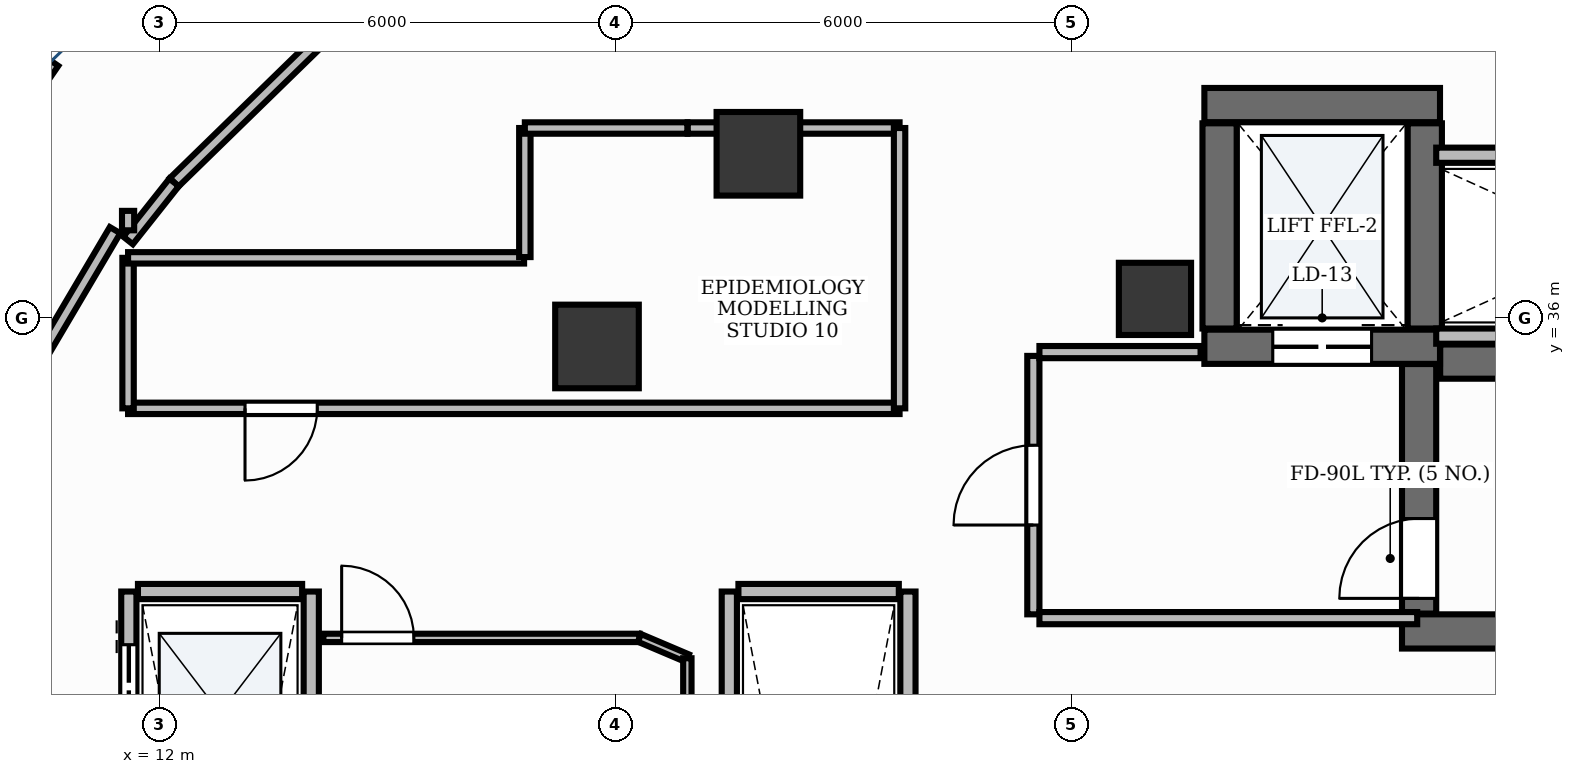
"""IFC4 building model, lengths in metres.
Left out: names, types, materials, properties, quantities, classifications, styles, units other than length and angle.
Written with IfcOpenShell. Run it as: python <this file> out.ifc"""

import sys

from ifc_helpers import new_model, si_unit, direction, frame, frame_2d, origin, origin_2d, place, context, subcontext, project, spatial, rectangle, extrude, element, fill, save


model = new_model("IFC4")
c1 = context("Model", 3, precision=1e-05, world=origin(), true_north=direction((0.0, 1.0)))
c2 = subcontext(c1, "Body", "Model", "MODEL_VIEW")
j1 = project(units=[si_unit("LENGTHUNIT", "METRE"), si_unit("PLANEANGLEUNIT", "RADIAN")], contexts=[c1])
p1 = place(None, origin())
s1 = spatial("IfcSite", under=j1, at=p1, CompositionType="ELEMENT")
p2 = place(p1, origin())
s2 = spatial("IfcBuilding", under=s1, at=p2, CompositionType="ELEMENT")
p3 = place(p2, frame((0.0, 0.0, 94.2)))
s3 = spatial("IfcBuildingStorey", under=s2, at=p3, CompositionType="ELEMENT", Elevation=94.2)
p4 = place(p3, frame((28.852, 35.425, 0.0), z_axis=(0.0, 0.0, 1.0), x_axis=(1.0, 0.0, 0.0)))
e1 = element("IfcWall", 1, at=p4, inside=s3, PredefinedType="SHEAR", context=c2, shape_type="SweptSolid", body=[
    extrude(rectangle(XDim=8.248, YDim=0.45, at=frame_2d((4.124, 0.0))), origin(), (0.0, 0.0, 1.0), 3.9),
])
p5 = place(p3, frame((28.35, 31.875, 0.0), z_axis=(0.0, 0.0, 1.0), x_axis=(1.0, 0.0, 0.0)))
e2 = element("IfcWall", 2, at=p5, inside=s3, PredefinedType="SHEAR", context=c2, shape_type="SweptSolid", body=[
    extrude(rectangle(XDim=8.75, YDim=0.45, at=frame_2d((4.375, 0.0))), origin(), (0.0, 0.0, 1.0), 3.9),
])
p6 = place(p3, frame((28.575, 32.11, 0.0), z_axis=(0.0, 0.0, 1.0), x_axis=(0.0, 1.0, 0.0)))
e3 = element("IfcWall", 3, at=p6, inside=s3, PredefinedType="SHEAR", context=c2, shape_type="SweptSolid", body=[
    extrude(rectangle(XDim=3.283, YDim=0.45, at=frame_2d((1.642, 0.0))), origin(), (0.0, 0.0, 1.0), 3.9),
])
p7 = place(p6, frame((0.2, 0.0, 0.0)))
e4 = element("IfcOpeningElement", 4, at=p7, cuts=e3, PredefinedType="OPENING", context=c2, shape_type="SweptSolid", body=[
    extrude(rectangle(XDim=1.05, YDim=2.15, at=frame_2d((0.525, 1.075))), frame((0.0, 0.24, 0.0), z_axis=(0.0, -1.0, 0.0), x_axis=(1.0, 0.0, 0.0)), (0.0, 0.0, 1.0), 0.48),
])
p8 = place(p3, frame((25.75, 38.8, 0.0), z_axis=(0.0, 0.0, 1.0), x_axis=(1.0, 0.0, 0.0)))
e5 = element("IfcWall", 5, at=p8, inside=s3, PredefinedType="SHEAR", context=c2, shape_type="SweptSolid", body=[
    extrude(rectangle(XDim=3.1, YDim=0.45, at=frame_2d((1.55, 0.0))), origin(), (0.0, 0.0, 1.0), 3.9),
])
p9 = place(p3, frame((25.75, 35.62, 0.0), z_axis=(0.0, 0.0, 1.0), x_axis=(1.0, 0.0, 0.0)))
e6 = element("IfcWall", 6, at=p9, inside=s3, PredefinedType="SHEAR", context=c2, shape_type="SweptSolid", body=[
    extrude(rectangle(XDim=3.1, YDim=0.45, at=frame_2d((1.55, 0.0))), origin(), (0.0, 0.0, 1.0), 3.9),
])
p10 = place(p9, frame((0.9, 0.0, 0.0)))
e7 = element("IfcOpeningElement", 7, at=p10, cuts=e6, PredefinedType="OPENING", context=c2, shape_type="SweptSolid", body=[
    extrude(rectangle(XDim=1.3, YDim=2.2, at=frame_2d((0.65, 1.1))), frame((0.0, 0.24, 0.0), z_axis=(0.0, -1.0, 0.0), x_axis=(1.0, 0.0, 0.0)), (0.0, 0.0, 1.0), 0.48),
])
for number, where, z_axis, x_axis in (
    (8, (25.95, 35.86, 0.0), (0.0, 0.0, 1.0), (0.0, 1.0, 0.0)),
    (9, (28.65, 35.86, 0.0), (0.0, 0.0, 1.0), (0.0, 1.0, 0.0)),
):
    element("IfcWall", number, at=place(p3, frame(where, z_axis=z_axis, x_axis=x_axis)), inside=s3, PredefinedType="SHEAR", context=c2, shape_type="SweptSolid", body=[
        extrude(rectangle(XDim=2.7, YDim=0.45, at=frame_2d((1.35, 0.0))), origin(), (0.0, 0.0, 1.0), 3.9),
    ])
p11 = place(p3, frame((25.1, 36.25, -0.0), z_axis=(0.0, 0.0, 1.0), x_axis=(1.0, 0.0, 0.0)))
e10 = element("IfcColumn", 10, at=p11, inside=s3, PredefinedType="PILASTER", context=c2, shape_type="SweptSolid", body=[
    extrude(rectangle(XDim=0.95, YDim=0.95, at=origin_2d()), origin(), (0.0, 0.0, 1.0), 3.901),
])
for number, where, z_axis, x_axis in (
    (11, (19.883, 38.159, -0.0), (0.0, 0.0, 1.0), (1.0, 0.0, 0.0)),
    (12, (17.759, 35.624, -0.0), (0.0, 0.0, 1.0), (1.0, 0.0, 0.0)),
):
    element("IfcColumn", number, at=place(p3, frame(where, z_axis=z_axis, x_axis=x_axis)), inside=s3, PredefinedType="COLUMN", context=c2, shape_type="SweptSolid", body=[
        extrude(rectangle(XDim=1.1, YDim=1.1, at=origin_2d()), origin(), (0.0, 0.0, 1.0), 3.901),
    ])
p12 = place(p3, frame((10.548, 39.4, 0.0), z_axis=(0.0, 0.0, 1.0), x_axis=(-0.566825798999, -0.823837674296, 0.0)))
e13 = element("IfcWall", 13, at=p12, inside=s3, PredefinedType="STANDARD", context=c2, shape_type="SweptSolid", body=[
    extrude(rectangle(XDim=5.826, YDim=0.3, at=frame_2d((2.913, 0.0))), origin(), (0.0, 0.0, 1.0), 3.47),
])
p13 = place(p3, frame((11.6, 21.6, 0.0), z_axis=(0.0, 0.0, 1.0), x_axis=(0.0, 1.0, 0.0)))
e14 = element("IfcWall", 14, at=p13, inside=s3, PredefinedType="PARTITIONING", context=c2, shape_type="SweptSolid", body=[
    extrude(rectangle(XDim=10.8, YDim=0.2, at=frame_2d((5.4, 0.0))), origin(), (0.0, 0.0, 1.0), 2.91),
])
p14 = place(p13, frame((0.9, 0.0, 0.0)))
e15 = element("IfcOpeningElement", 15, at=p14, cuts=e14, PredefinedType="OPENING", context=c2, shape_type="SweptSolid", body=[
    extrude(rectangle(XDim=1.1, YDim=2.2, at=frame_2d((0.55, 1.1))), frame((0.0, 0.115, 0.0), z_axis=(0.0, -1.0, 0.0), x_axis=(1.0, 0.0, 0.0)), (0.0, 0.0, 1.0), 0.23),
])
p15 = place(p13, frame((3.6, 0.0, 0.0)))
e16 = element("IfcOpeningElement", 16, at=p15, cuts=e14, PredefinedType="OPENING", context=c2, shape_type="SweptSolid", body=[
    extrude(rectangle(XDim=1.1, YDim=2.2, at=frame_2d((0.55, 1.1))), frame((0.0, 0.115, 0.0), z_axis=(0.0, -1.0, 0.0), x_axis=(1.0, 0.0, 0.0)), (0.0, 0.0, 1.0), 0.23),
])
p16 = place(p13, frame((6.3, 0.0, 0.0)))
e17 = element("IfcOpeningElement", 17, at=p16, cuts=e14, PredefinedType="OPENING", context=c2, shape_type="SweptSolid", body=[
    extrude(rectangle(XDim=1.1, YDim=2.2, at=frame_2d((0.55, 1.1))), frame((0.0, 0.115, 0.0), z_axis=(0.0, -1.0, 0.0), x_axis=(1.0, 0.0, 0.0)), (0.0, 0.0, 1.0), 0.23),
])
p17 = place(p13, frame((9.0, 0.0, 0.0)))
e18 = element("IfcOpeningElement", 18, at=p17, cuts=e14, PredefinedType="OPENING", context=c2, shape_type="SweptSolid", body=[
    extrude(rectangle(XDim=1.1, YDim=2.2, at=frame_2d((0.55, 1.1))), frame((0.0, 0.115, 0.0), z_axis=(0.0, -1.0, 0.0), x_axis=(1.0, 0.0, 0.0)), (0.0, 0.0, 1.0), 0.23),
])
p18 = place(p3, frame((14.0, 21.6, 0.0), z_axis=(0.0, 0.0, 1.0), x_axis=(0.0, 1.0, 0.0)))
e19 = element("IfcWall", 19, at=p18, inside=s3, PredefinedType="PARTITIONING", context=c2, shape_type="SweptSolid", body=[
    extrude(rectangle(XDim=10.8, YDim=0.2, at=frame_2d((5.4, 0.0))), origin(), (0.0, 0.0, 1.0), 2.91),
])
p19 = place(p3, frame((11.72, 32.4, 0.0), z_axis=(0.0, 0.0, 1.0), x_axis=(1.0, 0.0, 0.0)))
e20 = element("IfcWall", 20, at=p19, inside=s3, PredefinedType="PARTITIONING", context=c2, shape_type="SweptSolid", body=[
    extrude(rectangle(XDim=2.16, YDim=0.2, at=frame_2d((1.08, 0.0))), origin(), (0.0, 0.0, 1.0), 2.91),
])
for number, where, z_axis, x_axis in (
    (21, (19.5, 21.6, 0.0), (0.0, 0.0, 1.0), (0.0, 1.0, 0.0)),
    (22, (21.85, 21.6, 0.0), (0.0, 0.0, 1.0), (0.0, 1.0, 0.0)),
):
    element("IfcWall", number, at=place(p3, frame(where, z_axis=z_axis, x_axis=x_axis)), inside=s3, PredefinedType="PARTITIONING", context=c2, shape_type="SweptSolid", body=[
        extrude(rectangle(XDim=10.8, YDim=0.2, at=frame_2d((5.4, 0.0))), origin(), (0.0, 0.0, 1.0), 2.91),
    ])
p20 = place(p3, frame((19.62, 32.4, 0.0), z_axis=(0.0, 0.0, 1.0), x_axis=(1.0, 0.0, 0.0)))
e23 = element("IfcWall", 23, at=p20, inside=s3, PredefinedType="PARTITIONING", context=c2, shape_type="SweptSolid", body=[
    extrude(rectangle(XDim=2.11, YDim=0.2, at=frame_2d((1.055, 0.0))), origin(), (0.0, 0.0, 1.0), 2.91),
])
for number, where, z_axis, x_axis in (
    (24, (28.8, 35.76, 0.0), (0.0, 0.0, 1.0), (1.0, 0.0, 0.0)),
    (25, (28.8, 38.14, 0.0), (0.0, 0.0, 1.0), (1.0, 0.0, 0.0)),
):
    element("IfcWall", number, at=place(p3, frame(where, z_axis=z_axis, x_axis=x_axis)), inside=s3, PredefinedType="PARTITIONING", context=c2, shape_type="SweptSolid", body=[
        extrude(rectangle(XDim=4.57, YDim=0.2, at=frame_2d((2.285, 0.0))), origin(), (0.0, 0.0, 1.0), 2.91),
    ])
p21 = place(p3, frame((23.5, 32.1, 0.0), z_axis=(0.0, 0.0, 1.0), x_axis=(0.0, 1.0, 0.0)))
e26 = element("IfcWall", 26, at=p21, inside=s3, PredefinedType="PARTITIONING", context=c2, shape_type="SweptSolid", body=[
    extrude(rectangle(XDim=3.4, YDim=0.16, at=frame_2d((1.7, 0.0))), origin(), (0.0, 0.0, 1.0), 2.91),
])
p22 = place(p21, frame((1.175, 0.0, 0.0)))
e27 = element("IfcOpeningElement", 27, at=p22, cuts=e26, PredefinedType="OPENING", context=c2, shape_type="SweptSolid", body=[
    extrude(rectangle(XDim=1.05, YDim=2.15, at=frame_2d((0.525, 1.075))), frame((0.0, 0.095, 0.0), z_axis=(0.0, -1.0, 0.0), x_axis=(1.0, 0.0, 0.0)), (0.0, 0.0, 1.0), 0.19),
])
p23 = place(p3, frame((23.58, 32.05, 0.0), z_axis=(0.0, 0.0, 1.0), x_axis=(1.0, 0.0, 0.0)))
e28 = element("IfcWall", 28, at=p23, inside=s3, PredefinedType="PARTITIONING", context=c2, shape_type="SweptSolid", body=[
    extrude(rectangle(XDim=4.97, YDim=0.16, at=frame_2d((2.485, 0.0))), origin(), (0.0, 0.0, 1.0), 2.91),
])
p24 = place(p3, frame((23.58, 35.55, 0.0), z_axis=(0.0, 0.0, 1.0), x_axis=(1.0, 0.0, 0.0)))
e29 = element("IfcWall", 29, at=p24, inside=s3, PredefinedType="PARTITIONING", context=c2, shape_type="SweptSolid", body=[
    extrude(rectangle(XDim=2.12, YDim=0.16, at=frame_2d((1.06, 0.0))), origin(), (0.0, 0.0, 1.0), 2.91),
])
p25 = place(p3, frame((21.74, 34.81, 0.0), z_axis=(0.0, 0.0, 1.0), x_axis=(-1.0, 0.0, 0.0)))
e30 = element("IfcWall", 30, at=p25, inside=s3, PredefinedType="PARTITIONING", context=c2, shape_type="SweptSolid", body=[
    extrude(rectangle(XDim=10.15, YDim=0.15, at=frame_2d((5.075, 0.0))), origin(), (0.0, 0.0, 1.0), 2.91),
])
p26 = place(p25, frame((7.662, 0.0, 0.0)))
e31 = element("IfcOpeningElement", 31, at=p26, cuts=e30, PredefinedType="OPENING", context=c2, shape_type="SweptSolid", body=[
    extrude(rectangle(XDim=0.95, YDim=2.15, at=frame_2d((0.475, 1.075))), frame((0.0, 0.09, 0.0), z_axis=(0.0, -1.0, 0.0), x_axis=(1.0, 0.0, 0.0)), (0.0, 0.0, 1.0), 0.18),
])
p27 = place(p3, frame((14.16, 31.79, 0.0), z_axis=(0.0, 0.0, 1.0), x_axis=(1.0, 0.0, 0.0)))
e32 = element("IfcWall", 32, at=p27, inside=s3, PredefinedType="MOVABLE", context=c2, shape_type="SweptSolid", body=[
    extrude(rectangle(XDim=4.158, YDim=0.11, at=frame_2d((2.079, 0.0))), origin(), (0.0, 0.0, 1.0), 2.91),
])
p28 = place(p27, frame((0.24, 0.0, 0.0)))
e33 = element("IfcOpeningElement", 33, at=p28, cuts=e32, PredefinedType="OPENING", context=c2, shape_type="SweptSolid", body=[
    extrude(rectangle(XDim=0.95, YDim=2.15, at=frame_2d((0.475, 1.075))), frame((0.0, 0.07, 0.0), z_axis=(0.0, -1.0, 0.0), x_axis=(1.0, 0.0, 0.0)), (0.0, 0.0, 1.0), 0.14),
])
p29 = place(p3, frame((14.114, 39.653, 0.0), z_axis=(0.0, 0.0, 1.0), x_axis=(-0.716161838398, -0.697934252794, 0.0)))
e34 = element("IfcWall", 34, at=p29, inside=s3, PredefinedType="PARTITIONING", context=c2, shape_type="SweptSolid", body=[
    extrude(rectangle(XDim=2.679, YDim=0.16, at=frame_2d((1.339, 0.0))), origin(), (0.0, 0.0, 1.0), 2.91),
])
p30 = place(p3, frame((12.195, 37.782, 0.0), z_axis=(0.0, 0.0, 1.0), x_axis=(-0.621081637991, -0.783745876513, 0.0)))
e35 = element("IfcWall", 35, at=p30, inside=s3, PredefinedType="PARTITIONING", context=c2, shape_type="SweptSolid", body=[
    extrude(rectangle(XDim=0.974, YDim=0.16, at=frame_2d((0.487, 0.0))), origin(), (0.0, 0.0, 1.0), 2.91),
])
p31 = place(p3, frame((11.59, 37.152, 0.0), z_axis=(0.0, 0.0, 1.0), x_axis=(0.0, 1.0, 0.0)))
e36 = element("IfcWall", 36, at=p31, inside=s3, PredefinedType="PARTITIONING", context=c2, shape_type="SweptSolid", body=[
    extrude(rectangle(XDim=0.256, YDim=0.16, at=frame_2d((0.128, 0.0))), origin(), (0.0, 0.0, 1.0), 2.91),
])
p32 = place(p3, frame((11.419, 37.154, 0.0), z_axis=(0.0, 0.0, 1.0), x_axis=(-0.508183269016, -0.861248956511, 0.0)))
e37 = element("IfcWall", 37, at=p32, inside=s3, PredefinedType="PARTITIONING", context=c2, shape_type="SweptSolid", body=[
    extrude(rectangle(XDim=4.053, YDim=0.16, at=frame_2d((2.026, 0.0))), origin(), (0.0, 0.0, 1.0), 2.91),
])
p33 = place(p3, frame((18.952, 38.498, 0.0), z_axis=(0.0, 0.0, 1.0), x_axis=(1.0, 0.0, 0.0)))
e38 = element("IfcWall", 38, at=p33, inside=s3, PredefinedType="PARTITIONING", context=c2, shape_type="SweptSolid", body=[
    extrude(rectangle(XDim=2.788, YDim=0.15, at=frame_2d((1.394, 0.0))), origin(), (0.0, 0.0, 1.0), 2.91),
])
p34 = place(p3, frame((21.74, 38.498, 0.0), z_axis=(0.0, 0.0, 1.0), x_axis=(0.0, -1.0, 0.0)))
e39 = element("IfcWall", 39, at=p34, inside=s3, PredefinedType="PARTITIONING", context=c2, shape_type="SweptSolid", body=[
    extrude(rectangle(XDim=3.688, YDim=0.15, at=frame_2d((1.844, 0.0))), origin(), (0.0, 0.0, 1.0), 2.91),
])
p35 = place(p3, frame((11.59, 34.81, 0.0), z_axis=(0.0, 0.0, 1.0), x_axis=(0.0, 1.0, 0.0)))
e40 = element("IfcWall", 40, at=p35, inside=s3, PredefinedType="PARTITIONING", context=c2, shape_type="SweptSolid", body=[
    extrude(rectangle(XDim=1.98, YDim=0.15, at=frame_2d((0.99, 0.0))), origin(), (0.0, 0.0, 1.0), 2.91),
])
p36 = place(p3, frame((11.59, 36.79, 0.0), z_axis=(0.0, 0.0, 1.0), x_axis=(1.0, 0.0, 0.0)))
e41 = element("IfcWall", 41, at=p36, inside=s3, PredefinedType="PARTITIONING", context=c2, shape_type="SweptSolid", body=[
    extrude(rectangle(XDim=5.21, YDim=0.15, at=frame_2d((2.605, 0.0))), origin(), (0.0, 0.0, 1.0), 2.91),
])
p37 = place(p3, frame((16.81, 36.8, 0.0), z_axis=(0.0, 0.0, 1.0), x_axis=(0.0, 1.0, 0.0)))
e42 = element("IfcWall", 42, at=p37, inside=s3, PredefinedType="PARTITIONING", context=c2, shape_type="SweptSolid", body=[
    extrude(rectangle(XDim=1.698, YDim=0.15, at=frame_2d((0.849, 0.0))), origin(), (0.0, 0.0, 1.0), 2.91),
])
p38 = place(p3, frame((16.81, 38.498, 0.0), z_axis=(0.0, 0.0, 1.0), x_axis=(1.0, 0.0, 0.0)))
e43 = element("IfcWall", 43, at=p38, inside=s3, PredefinedType="PARTITIONING", context=c2, shape_type="SweptSolid", body=[
    extrude(rectangle(XDim=2.138, YDim=0.15, at=frame_2d((1.069, 0.0))), origin(), (0.0, 0.0, 1.0), 2.91),
])
p39 = place(p3, frame((18.318, 31.79, 0.0), z_axis=(0.0, 0.0, 1.0), x_axis=(0.920523463189, -0.390687283795, 0.0)))
e44 = element("IfcWall", 44, at=p39, inside=s3, PredefinedType="MOVABLE", context=c2, shape_type="SweptSolid", body=[
    extrude(rectangle(XDim=0.684, YDim=0.11, at=frame_2d((0.342, 0.0))), origin(), (0.0, 0.0, 1.0), 2.91),
])
p40 = place(p3, frame((18.948, 31.522, 0.0), z_axis=(0.0, 0.0, 1.0), x_axis=(0.0, -1.0, 0.0)))
e45 = element("IfcWall", 45, at=p40, inside=s3, PredefinedType="MOVABLE", context=c2, shape_type="SweptSolid", body=[
    extrude(rectangle(XDim=3.475, YDim=0.11, at=frame_2d((1.738, 0.0))), origin(), (0.0, 0.0, 1.0), 2.91),
])
p41 = place(p7, origin())
e46 = element("IfcDoor", 46, at=p41, inside=s3, OperationType="SINGLE_SWING_LEFT", PredefinedType="DOOR", context=c2, shape_type="SweptSolid", body=[
    extrude(rectangle(XDim=1.05, YDim=2.15, at=frame_2d((0.525, 1.075))), frame((0.0, 0.025, 0.0), z_axis=(0.0, -1.0, 0.0), x_axis=(1.0, 0.0, 0.0)), (0.0, 0.0, 1.0), 0.05),
])
fill(e4, e46)
p42 = place(p17, origin())
e47 = element("IfcDoor", 47, at=p42, inside=s3, OperationType="DOUBLE_DOOR_SLIDING", PredefinedType="DOOR", context=c2, shape_type="SweptSolid", body=[
    extrude(rectangle(XDim=1.1, YDim=2.2, at=frame_2d((0.55, 1.1))), frame((0.0, 0.025, 0.0), z_axis=(0.0, -1.0, 0.0), x_axis=(1.0, 0.0, 0.0)), (0.0, 0.0, 1.0), 0.05),
])
fill(e18, e47)
p43 = place(p10, origin())
e48 = element("IfcDoor", 48, at=p43, inside=s3, OperationType="DOUBLE_DOOR_SLIDING", PredefinedType="DOOR", context=c2, shape_type="SweptSolid", body=[
    extrude(rectangle(XDim=1.3, YDim=2.2, at=frame_2d((0.65, 1.1))), frame((0.0, 0.025, 0.0), z_axis=(0.0, -1.0, 0.0), x_axis=(1.0, 0.0, 0.0)), (0.0, 0.0, 1.0), 0.05),
])
fill(e7, e48)
p44 = place(p22, origin())
e49 = element("IfcDoor", 49, at=p44, inside=s3, OperationType="SINGLE_SWING_LEFT", PredefinedType="DOOR", context=c2, shape_type="SweptSolid", body=[
    extrude(rectangle(XDim=1.05, YDim=2.15, at=frame_2d((0.525, 1.075))), frame((0.0, 0.025, 0.0), z_axis=(0.0, -1.0, 0.0), x_axis=(1.0, 0.0, 0.0)), (0.0, 0.0, 1.0), 0.05),
])
fill(e27, e49)
p45 = place(p26, origin())
e50 = element("IfcDoor", 50, at=p45, inside=s3, OperationType="SINGLE_SWING_RIGHT", PredefinedType="DOOR", context=c2, shape_type="SweptSolid", body=[
    extrude(rectangle(XDim=0.95, YDim=2.15, at=frame_2d((0.475, 1.075))), frame((0.0, 0.025, 0.0), z_axis=(0.0, -1.0, 0.0), x_axis=(1.0, 0.0, 0.0)), (0.0, 0.0, 1.0), 0.05),
])
fill(e31, e50)
p46 = place(p28, origin())
e51 = element("IfcDoor", 51, at=p46, inside=s3, OperationType="SINGLE_SWING_LEFT", PredefinedType="DOOR", context=c2, shape_type="SweptSolid", body=[
    extrude(rectangle(XDim=0.95, YDim=2.15, at=frame_2d((0.475, 1.075))), frame((0.0, 0.025, 0.0), z_axis=(0.0, -1.0, 0.0), x_axis=(1.0, 0.0, 0.0)), (0.0, 0.0, 1.0), 0.05),
])
fill(e33, e51)
save(model, sys.argv[1])
